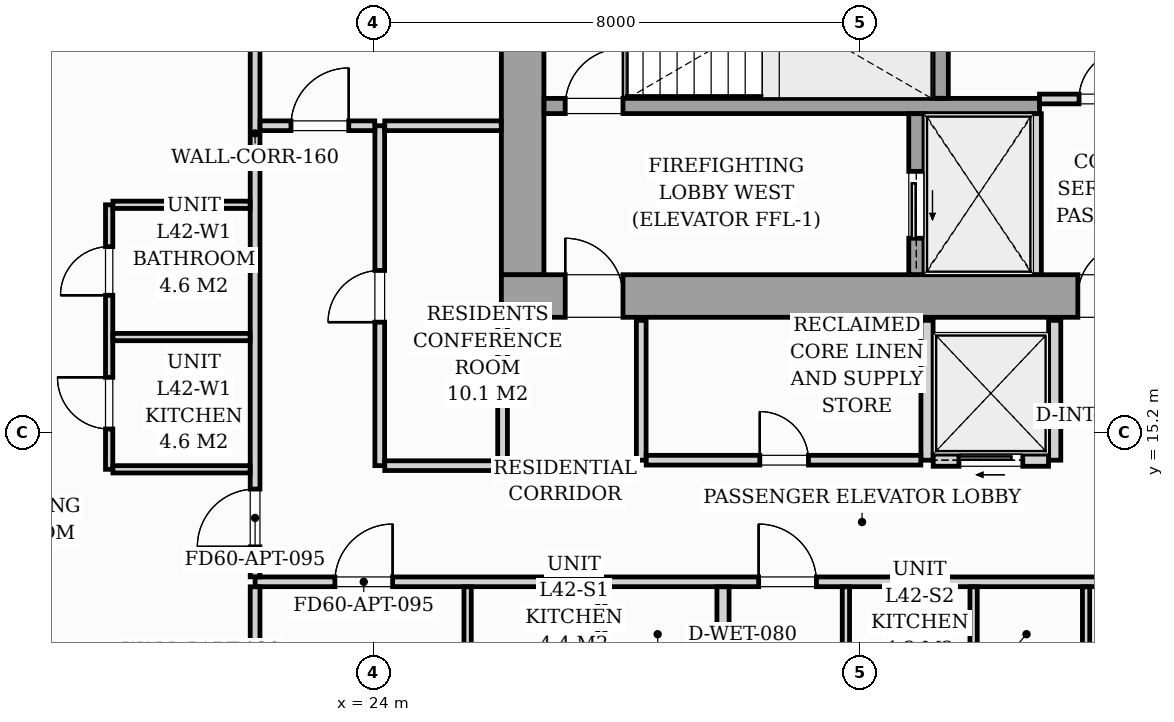
"""IFC4 building model, lengths in metres.
Left out: names, types, materials, properties, quantities, classifications, styles, units other than length and angle.
Written with IfcOpenShell. Run it as: python <this file> out.ifc"""

import sys

from ifc_helpers import new_model, si_unit, direction, frame, frame_2d, origin, origin_2d, place, context, subcontext, project, spatial, rectangle, i_section, extrude, source, transform, mapped, element, fill, save


model = new_model("IFC4")
c1 = context("Model", 3, precision=1e-05, world=origin(), true_north=direction((0.0, 1.0)))
c2 = subcontext(c1, "Body", "Model", "MODEL_VIEW")
j1 = project(units=[si_unit("LENGTHUNIT", "METRE"), si_unit("PLANEANGLEUNIT", "RADIAN")], contexts=[c1])
p1 = place(None, origin())
s1 = spatial("IfcSite", under=j1, at=p1, CompositionType="ELEMENT")
p2 = place(p1, origin())
s2 = spatial("IfcBuilding", under=s1, at=p2, CompositionType="ELEMENT")
p3 = place(p2, frame((0.0, 0.0, 147.0)))
s3 = spatial("IfcBuildingStorey", under=s2, at=p3, CompositionType="ELEMENT", Elevation=147.0)
m1 = source(origin(), c2, "Body", "SweptSolid", [
    extrude(i_section(OverallWidth=0.421, OverallDepth=0.465, WebThickness=0.045, FlangeThickness=0.073, FilletRadius=0.018, at=origin_2d()), origin(), (0.0, 0.0, 1.0), 3.196),
])
for number, where, z_axis, x_axis in (
    (1, (26.4, 17.4, 0.002), (0.0, 0.0, 1.0), (1.0, 0.0, 0.0)),
    (2, (33.12, 17.4, 0.002), (0.0, 0.0, 1.0), (1.0, 0.0, 0.0)),
):
    element("IfcColumn", number, at=place(p3, frame(where, z_axis=z_axis, x_axis=x_axis)), inside=s3, PredefinedType="PILASTER", context=c2, shape_type="MappedRepresentation", body=[
        mapped(m1, transform((0.0, 0.0, 0.0), scale=1.0)),
    ])
p4 = place(p3, frame((26.1, 17.45, 0.0), z_axis=(0.0, 0.0, 1.0), x_axis=(1.0, 0.0, 0.0)))
e3 = element("IfcWall", 3, at=p4, inside=s3, PredefinedType="SHEAR", context=c2, shape_type="SweptSolid", body=[
    extrude(rectangle(XDim=19.8, YDim=0.7, at=frame_2d((9.9, 0.0))), origin(), (0.0, 0.0, 1.0), 3.2),
])
p5 = place(p4, frame((1.05, 0.0, 0.0)))
e4 = element("IfcOpeningElement", 4, at=p5, cuts=e3, PredefinedType="OPENING", context=c2, shape_type="SweptSolid", body=[
    extrude(rectangle(XDim=0.95, YDim=2.06, at=frame_2d((0.475, 1.03))), frame((0.0, 0.36, 0.0), z_axis=(0.0, -1.0, 0.0), x_axis=(1.0, 0.0, 0.0)), (0.0, 0.0, 1.0), 0.72),
])
p6 = place(p4, frame((9.48, 0.0, 0.0)))
e5 = element("IfcOpeningElement", 5, at=p6, cuts=e3, PredefinedType="OPENING", context=c2, shape_type="SweptSolid", body=[
    extrude(rectangle(XDim=0.85, YDim=2.0, at=frame_2d((0.425, 1.0))), frame((0.0, 0.36, 0.0), z_axis=(0.0, -1.0, 0.0), x_axis=(1.0, 0.0, 0.0)), (0.0, 0.0, 1.0), 0.72),
])
p7 = place(p4, frame((17.65, 0.0, 0.0)))
e6 = element("IfcOpeningElement", 6, at=p7, cuts=e3, PredefinedType="OPENING", context=c2, shape_type="SweptSolid", body=[
    extrude(rectangle(XDim=0.95, YDim=2.06, at=frame_2d((0.475, 1.03))), frame((0.0, 0.36, 0.0), z_axis=(0.0, -1.0, 0.0), x_axis=(1.0, 0.0, 0.0)), (0.0, 0.0, 1.0), 0.72),
])
p8 = place(p3, frame((26.45, 17.802, 0.0), z_axis=(0.0, 0.0, 1.0), x_axis=(0.0, 1.0, 0.0)))
e7 = element("IfcWall", 7, at=p8, inside=s3, PredefinedType="SHEAR", context=c2, shape_type="SweptSolid", body=[
    extrude(rectangle(XDim=5.796, YDim=0.7, at=frame_2d((2.898, 0.0))), origin(), (0.0, 0.0, 1.0), 3.2),
])
p9 = place(p3, frame((26.802, 20.575, 0.0), z_axis=(0.0, 0.0, 1.0), x_axis=(1.0, 0.0, 0.0)))
e8 = element("IfcWall", 8, at=p9, inside=s3, PredefinedType="SOLIDWALL", context=c2, shape_type="SweptSolid", body=[
    extrude(rectangle(XDim=8.148, YDim=0.25, at=frame_2d((4.074, 0.0))), origin(), (0.0, 0.0, 1.0), 3.2),
])
p10 = place(p9, frame((0.348, 0.0, 0.0)))
e9 = element("IfcOpeningElement", 9, at=p10, cuts=e8, PredefinedType="OPENING", context=c2, shape_type="SweptSolid", body=[
    extrude(rectangle(XDim=0.95, YDim=2.06, at=frame_2d((0.475, 1.03))), frame((0.0, 0.135, 0.0), z_axis=(0.0, -1.0, 0.0), x_axis=(1.0, 0.0, 0.0)), (0.0, 0.0, 1.0), 0.27),
])
p11 = place(p3, frame((33.325, 20.702, 0.0), z_axis=(0.0, 0.0, 1.0), x_axis=(0.0, 1.0, 0.0)))
e10 = element("IfcWall", 10, at=p11, inside=s3, PredefinedType="SOLIDWALL", context=c2, shape_type="SweptSolid", body=[
    extrude(rectangle(XDim=2.896, YDim=0.25, at=frame_2d((1.448, 0.0))), origin(), (0.0, 0.0, 1.0), 3.2),
])
p12 = place(p3, frame((32.925, 17.802, 0.0), z_axis=(0.0, 0.0, 1.0), x_axis=(0.0, 1.0, 0.0)))
e11 = element("IfcWall", 11, at=p12, inside=s3, PredefinedType="SOLIDWALL", context=c2, shape_type="SweptSolid", body=[
    extrude(rectangle(XDim=2.646, YDim=0.25, at=frame_2d((1.323, 0.0))), origin(), (0.0, 0.0, 1.0), 3.2),
])
p13 = place(p12, frame((0.598, 0.0, 0.0)))
e12 = element("IfcOpeningElement", 12, at=p13, cuts=e11, PredefinedType="OPENING", context=c2, shape_type="SweptSolid", body=[
    extrude(rectangle(XDim=1.1, YDim=2.08, at=frame_2d((0.55, 1.04))), frame((0.0, 0.135, 0.0), z_axis=(0.0, -1.0, 0.0), x_axis=(1.0, 0.0, 0.0)), (0.0, 0.0, 1.0), 0.27),
])
p14 = place(p3, frame((34.9, 17.802, 0.0), z_axis=(0.0, 0.0, 1.0), x_axis=(0.0, 1.0, 0.0)))
e13 = element("IfcWall", 13, at=p14, inside=s3, PredefinedType="PARTITIONING", context=c2, shape_type="SweptSolid", body=[
    extrude(rectangle(XDim=2.646, YDim=0.16, at=frame_2d((1.323, 0.0))), origin(), (0.0, 0.0, 1.0), 2.94),
])
p15 = place(p3, frame((34.95, 20.69, 0.0), z_axis=(0.0, 0.0, 1.0), x_axis=(1.0, 0.0, 0.0)))
e14 = element("IfcWall", 14, at=p15, inside=s3, PredefinedType="PARTITIONING", context=c2, shape_type="SweptSolid", body=[
    extrude(rectangle(XDim=2.1, YDim=0.16, at=frame_2d((1.05, 0.0))), origin(), (0.0, 0.0, 1.0), 2.94),
])
p16 = place(p15, frame((0.65, 0.0, 0.0)))
e15 = element("IfcOpeningElement", 15, at=p16, cuts=e14, PredefinedType="OPENING", context=c2, shape_type="SweptSolid", body=[
    extrude(rectangle(XDim=0.8, YDim=2.05, at=frame_2d((0.4, 1.025))), frame((0.0, 0.09, 0.0), z_axis=(0.0, -1.0, 0.0), x_axis=(1.0, 0.0, 0.0)), (0.0, 0.0, 1.0), 0.18),
])
p17 = place(p3, frame((28.4, 14.75, 0.0), z_axis=(0.0, 0.0, 1.0), x_axis=(0.0, 1.0, 0.0)))
e16 = element("IfcWall", 16, at=p17, inside=s3, PredefinedType="PARTITIONING", context=c2, shape_type="SweptSolid", body=[
    extrude(rectangle(XDim=2.3, YDim=0.16, at=frame_2d((1.15, 0.0))), origin(), (0.0, 0.0, 1.0), 2.94),
])
p18 = place(p3, frame((33.1, 14.75, 0.0), z_axis=(0.0, 0.0, 1.0), x_axis=(0.0, 1.0, 0.0)))
e17 = element("IfcWall", 17, at=p18, inside=s3, PredefinedType="PARTITIONING", context=c2, shape_type="SweptSolid", body=[
    extrude(rectangle(XDim=2.3, YDim=0.2, at=frame_2d((1.15, 0.0))), origin(), (0.0, 0.0, 1.0), 2.94),
])
p19 = place(p3, frame((28.482, 14.75, 0.0), z_axis=(0.0, 0.0, 1.0), x_axis=(1.0, 0.0, 0.0)))
e18 = element("IfcWall", 18, at=p19, inside=s3, PredefinedType="PARTITIONING", context=c2, shape_type="SweptSolid", body=[
    extrude(rectangle(XDim=4.516, YDim=0.16, at=frame_2d((2.258, 0.0))), origin(), (0.0, 0.0, 1.0), 2.94),
])
p20 = place(p19, frame((1.868, 0.0, 0.0)))
e19 = element("IfcOpeningElement", 19, at=p20, cuts=e18, PredefinedType="OPENING", context=c2, shape_type="SweptSolid", body=[
    extrude(rectangle(XDim=0.8, YDim=2.05, at=frame_2d((0.4, 1.025))), frame((0.0, 0.09, 0.0), z_axis=(0.0, -1.0, 0.0), x_axis=(1.0, 0.0, 0.0)), (0.0, 0.0, 1.0), 0.18),
])
p21 = place(p3, frame((35.2, 14.75, 0.0), z_axis=(0.0, 0.0, 1.0), x_axis=(0.0, 1.0, 0.0)))
e20 = element("IfcWall", 20, at=p21, inside=s3, PredefinedType="PARTITIONING", context=c2, shape_type="SweptSolid", body=[
    extrude(rectangle(XDim=2.3, YDim=0.2, at=frame_2d((1.15, 0.0))), origin(), (0.0, 0.0, 1.0), 2.94),
])
p22 = place(p3, frame((33.202, 14.75, 0.0), z_axis=(0.0, 0.0, 1.0), x_axis=(1.0, 0.0, 0.0)))
e21 = element("IfcWall", 21, at=p22, inside=s3, PredefinedType="PARTITIONING", context=c2, shape_type="SweptSolid", body=[
    extrude(rectangle(XDim=1.896, YDim=0.2, at=frame_2d((0.948, 0.0))), origin(), (0.0, 0.0, 1.0), 2.94),
])
p23 = place(p22, frame((0.423, 0.0, 0.0)))
e22 = element("IfcOpeningElement", 22, at=p23, cuts=e21, PredefinedType="OPENING", context=c2, shape_type="SweptSolid", body=[
    extrude(rectangle(XDim=1.05, YDim=2.08, at=frame_2d((0.525, 1.04))), frame((0.0, 0.11, 0.0), z_axis=(0.0, -1.0, 0.0), x_axis=(1.0, 0.0, 0.0)), (0.0, 0.0, 1.0), 0.22),
])
p24 = place(p3, frame((22.05, 12.75, 0.0), z_axis=(0.0, 0.0, 1.0), x_axis=(1.0, 0.0, 0.0)))
e23 = element("IfcWall", 23, at=p24, inside=s3, PredefinedType="PARTITIONING", context=c2, shape_type="SweptSolid", body=[
    extrude(rectangle(XDim=25.65, YDim=0.16, at=frame_2d((12.825, 0.0))), origin(), (0.0, 0.0, 1.0), 2.94),
])
p25 = place(p24, frame((1.312, 0.0, 0.0)))
e24 = element("IfcOpeningElement", 24, at=p25, cuts=e23, PredefinedType="OPENING", context=c2, shape_type="SweptSolid", body=[
    extrude(rectangle(XDim=0.95, YDim=2.06, at=frame_2d((0.475, 1.03))), frame((0.0, 0.09, 0.0), z_axis=(0.0, -1.0, 0.0), x_axis=(1.0, 0.0, 0.0)), (0.0, 0.0, 1.0), 0.18),
])
p26 = place(p24, frame((8.281, 0.0, 0.0)))
e25 = element("IfcOpeningElement", 25, at=p26, cuts=e23, PredefinedType="OPENING", context=c2, shape_type="SweptSolid", body=[
    extrude(rectangle(XDim=0.95, YDim=2.06, at=frame_2d((0.475, 1.03))), frame((0.0, 0.09, 0.0), z_axis=(0.0, -1.0, 0.0), x_axis=(1.0, 0.0, 0.0)), (0.0, 0.0, 1.0), 0.18),
])
p27 = place(p24, frame((17.268, 0.0, 0.0)))
e26 = element("IfcOpeningElement", 26, at=p27, cuts=e23, PredefinedType="OPENING", context=c2, shape_type="SweptSolid", body=[
    extrude(rectangle(XDim=0.95, YDim=2.06, at=frame_2d((0.475, 1.03))), frame((0.0, 0.09, 0.0), z_axis=(0.0, -1.0, 0.0), x_axis=(1.0, 0.0, 0.0)), (0.0, 0.0, 1.0), 0.18),
])
p28 = place(p3, frame((22.05, 8.253, 0.0), z_axis=(0.0, 0.0, 1.0), x_axis=(0.0, 1.0, 0.0)))
e27 = element("IfcWall", 27, at=p28, inside=s3, PredefinedType="PARTITIONING", context=c2, shape_type="SweptSolid", body=[
    extrude(rectangle(XDim=4.415, YDim=0.16, at=frame_2d((2.208, 0.0))), origin(), (0.0, 0.0, 1.0), 2.94),
])
p29 = place(p3, frame((22.05, 12.832, 0.0), z_axis=(0.0, 0.0, 1.0), x_axis=(0.0, 1.0, 0.0)))
e28 = element("IfcWall", 28, at=p29, inside=s3, PredefinedType="PARTITIONING", context=c2, shape_type="SweptSolid", body=[
    extrude(rectangle(XDim=14.585, YDim=0.16, at=frame_2d((7.292, 0.0))), origin(), (0.0, 0.0, 1.0), 2.94),
])
p30 = place(p29, frame((0.493, 0.0, 0.0)))
e29 = element("IfcOpeningElement", 29, at=p30, cuts=e28, PredefinedType="OPENING", context=c2, shape_type="SweptSolid", body=[
    extrude(rectangle(XDim=0.95, YDim=2.06, at=frame_2d((0.475, 1.03))), frame((0.0, 0.09, 0.0), z_axis=(0.0, -1.0, 0.0), x_axis=(1.0, 0.0, 0.0)), (0.0, 0.0, 1.0), 0.18),
])
for number, where, z_axis, x_axis in (
    (30, (25.545, 10.562, 0.0), (0.0, 0.0, 1.0), (0.0, 1.0, 0.0)),
    (31, (27.745, 10.562, 0.0), (0.0, 0.0, 1.0), (0.0, 1.0, 0.0)),
):
    element("IfcWall", number, at=place(p3, frame(where, z_axis=z_axis, x_axis=x_axis)), inside=s3, PredefinedType="PARTITIONING", context=c2, shape_type="SweptSolid", body=[
        extrude(rectangle(XDim=2.106, YDim=0.12, at=frame_2d((1.053, 0.0))), origin(), (0.0, 0.0, 1.0), 2.94),
    ])
p31 = place(p3, frame((29.745, 10.562, 0.0), z_axis=(0.0, 0.0, 1.0), x_axis=(0.0, 1.0, 0.0)))
e32 = element("IfcWall", 32, at=p31, inside=s3, PredefinedType="PARTITIONING", context=c2, shape_type="SweptSolid", body=[
    extrude(rectangle(XDim=2.106, YDim=0.2, at=frame_2d((1.053, 0.0))), origin(), (0.0, 0.0, 1.0), 2.94),
])
p32 = place(p3, frame((35.716, 6.754, 0.0), z_axis=(0.0, 0.0, 1.0), x_axis=(0.0, 1.0, 0.0)))
e33 = element("IfcWall", 33, at=p32, inside=s3, PredefinedType="PARTITIONING", context=c2, shape_type="SweptSolid", body=[
    extrude(rectangle(XDim=5.914, YDim=0.12, at=frame_2d((2.957, 0.0))), origin(), (0.0, 0.0, 1.0), 2.94),
])
p33 = place(p32, frame((2.646, 0.0, 0.0)))
e34 = element("IfcOpeningElement", 34, at=p33, cuts=e33, PredefinedType="OPENING", context=c2, shape_type="SweptSolid", body=[
    extrude(rectangle(XDim=0.9, YDim=2.05, at=frame_2d((0.45, 1.025))), frame((0.0, 0.07, 0.0), z_axis=(0.0, -1.0, 0.0), x_axis=(1.0, 0.0, 0.0)), (0.0, 0.0, 1.0), 0.14),
])
for number, where, z_axis, x_axis in (
    (35, (33.866, 10.562, 0.0), (0.0, 0.0, 1.0), (0.0, 1.0, 0.0)),
    (36, (31.766, 10.562, 0.0), (0.0, 0.0, 1.0), (0.0, 1.0, 0.0)),
):
    element("IfcWall", number, at=place(p3, frame(where, z_axis=z_axis, x_axis=x_axis)), inside=s3, PredefinedType="PARTITIONING", context=c2, shape_type="SweptSolid", body=[
        extrude(rectangle(XDim=2.106, YDim=0.12, at=frame_2d((1.053, 0.0))), origin(), (0.0, 0.0, 1.0), 2.94),
    ])
p34 = place(p3, frame((19.65, 14.6, 0.0), z_axis=(0.0, 0.0, 1.0), x_axis=(0.0, 1.0, 0.0)))
e37 = element("IfcWall", 37, at=p34, inside=s3, PredefinedType="PARTITIONING", context=c2, shape_type="SweptSolid", body=[
    extrude(rectangle(XDim=4.35, YDim=0.12, at=frame_2d((2.175, 0.0))), origin(), (0.0, 0.0, 1.0), 2.94),
])
p35 = place(p34, frame((0.663, 0.0, 0.0)))
e38 = element("IfcOpeningElement", 38, at=p35, cuts=e37, PredefinedType="OPENING", context=c2, shape_type="SweptSolid", body=[
    extrude(rectangle(XDim=0.85, YDim=2.05, at=frame_2d((0.425, 1.025))), frame((0.0, 0.07, 0.0), z_axis=(0.0, -1.0, 0.0), x_axis=(1.0, 0.0, 0.0)), (0.0, 0.0, 1.0), 0.14),
])
p36 = place(p34, frame((2.862, 0.0, 0.0)))
e39 = element("IfcOpeningElement", 39, at=p36, cuts=e37, PredefinedType="OPENING", context=c2, shape_type="SweptSolid", body=[
    extrude(rectangle(XDim=0.8, YDim=2.02, at=frame_2d((0.4, 1.01))), frame((0.0, 0.07, 0.0), z_axis=(0.0, -1.0, 0.0), x_axis=(1.0, 0.0, 0.0)), (0.0, 0.0, 1.0), 0.14),
])
for number, where, z_axis, x_axis in (
    (40, (19.712, 16.775, 0.0), (0.0, 0.0, 1.0), (1.0, 0.0, 0.0)),
    (41, (19.712, 14.6, 0.0), (0.0, 0.0, 1.0), (1.0, 0.0, 0.0)),
    (42, (19.712, 18.95, 0.0), (0.0, 0.0, 1.0), (1.0, 0.0, 0.0)),
):
    element("IfcWall", number, at=place(p3, frame(where, z_axis=z_axis, x_axis=x_axis)), inside=s3, PredefinedType="PARTITIONING", context=c2, shape_type="SweptSolid", body=[
        extrude(rectangle(XDim=2.256, YDim=0.12, at=frame_2d((1.128, 0.0))), origin(), (0.0, 0.0, 1.0), 2.94),
    ])
p37 = place(p3, frame((24.1, 14.66, 0.0), z_axis=(0.0, 0.0, 1.0), x_axis=(0.0, 1.0, 0.0)))
e43 = element("IfcWall", 43, at=p37, inside=s3, PredefinedType="PARTITIONING", context=c2, shape_type="SweptSolid", body=[
    extrude(rectangle(XDim=5.59, YDim=0.16, at=frame_2d((2.795, 0.0))), origin(), (0.0, 0.0, 1.0), 2.94),
])
p38 = place(p37, frame((2.36, 0.0, 0.0)))
e44 = element("IfcOpeningElement", 44, at=p38, cuts=e43, PredefinedType="OPENING", context=c2, shape_type="SweptSolid", body=[
    extrude(rectangle(XDim=0.85, YDim=2.0, at=frame_2d((0.425, 1.0))), frame((0.0, 0.09, 0.0), z_axis=(0.0, -1.0, 0.0), x_axis=(1.0, 0.0, 0.0)), (0.0, 0.0, 1.0), 0.18),
])
p39 = place(p3, frame((22.132, 20.25, 0.0), z_axis=(0.0, 0.0, 1.0), x_axis=(1.0, 0.0, 0.0)))
e45 = element("IfcWall", 45, at=p39, inside=s3, PredefinedType="PARTITIONING", context=c2, shape_type="SweptSolid", body=[
    extrude(rectangle(XDim=1.886, YDim=0.16, at=frame_2d((0.943, 0.0))), origin(), (0.0, 0.0, 1.0), 2.94),
])
p40 = place(p39, frame((0.508, 0.0, 0.0)))
e46 = element("IfcOpeningElement", 46, at=p40, cuts=e45, PredefinedType="OPENING", context=c2, shape_type="SweptSolid", body=[
    extrude(rectangle(XDim=0.95, YDim=2.06, at=frame_2d((0.475, 1.03))), frame((0.0, 0.09, 0.0), z_axis=(0.0, -1.0, 0.0), x_axis=(1.0, 0.0, 0.0)), (0.0, 0.0, 1.0), 0.18),
])
p41 = place(p3, frame((24.182, 20.25, 0.0), z_axis=(0.0, 0.0, 1.0), x_axis=(1.0, 0.0, 0.0)))
e47 = element("IfcWall", 47, at=p41, inside=s3, PredefinedType="PARTITIONING", context=c2, shape_type="SweptSolid", body=[
    extrude(rectangle(XDim=1.916, YDim=0.16, at=frame_2d((0.958, 0.0))), origin(), (0.0, 0.0, 1.0), 2.94),
])
p42 = place(p3, frame((26.12, 14.66, 0.0), z_axis=(0.0, 0.0, 1.0), x_axis=(0.0, 1.0, 0.0)))
e48 = element("IfcWall", 48, at=p42, inside=s3, PredefinedType="PARTITIONING", context=c2, shape_type="SweptSolid", body=[
    extrude(rectangle(XDim=2.438, YDim=0.16, at=frame_2d((1.219, 0.0))), origin(), (0.0, 0.0, 1.0), 2.94),
])
p43 = place(p3, frame((24.182, 14.66, 0.0), z_axis=(0.0, 0.0, 1.0), x_axis=(1.0, 0.0, 0.0)))
e49 = element("IfcWall", 49, at=p43, inside=s3, PredefinedType="PARTITIONING", context=c2, shape_type="SweptSolid", body=[
    extrude(rectangle(XDim=1.856, YDim=0.16, at=frame_2d((0.928, 0.0))), origin(), (0.0, 0.0, 1.0), 2.94),
])
m2 = source(origin(), c2, "Body", "SweptSolid", [
    extrude(rectangle(XDim=0.95, YDim=2.06, at=frame_2d((0.475, 1.03))), frame((0.0, 0.025, 0.0), z_axis=(0.0, -1.0, 0.0), x_axis=(1.0, 0.0, 0.0)), (0.0, 0.0, 1.0), 0.05),
])
p44 = place(p5, origin())
e50 = element("IfcDoor", 50, at=p44, inside=s3, OperationType="SINGLE_SWING_LEFT", PredefinedType="DOOR", context=c2, shape_type="MappedRepresentation", body=[
    mapped(m2, transform((0.0, 0.0, 0.0), scale=1.0)),
])
fill(e4, e50)
m3 = source(origin(), c2, "Body", "SweptSolid", [
    extrude(rectangle(XDim=0.85, YDim=2.0, at=frame_2d((0.425, 1.0))), frame((0.0, 0.025, 0.0), z_axis=(0.0, -1.0, 0.0), x_axis=(1.0, 0.0, 0.0)), (0.0, 0.0, 1.0), 0.05),
])
p45 = place(p6, origin())
e51 = element("IfcDoor", 51, at=p45, inside=s3, OperationType="SINGLE_SWING_RIGHT", PredefinedType="DOOR", context=c2, shape_type="MappedRepresentation", body=[
    mapped(m3, transform((0.0, 0.0, 0.0), scale=1.0)),
])
fill(e5, e51)
p46 = place(p10, origin())
e52 = element("IfcDoor", 52, at=p46, inside=s3, OperationType="SINGLE_SWING_RIGHT", PredefinedType="DOOR", context=c2, shape_type="MappedRepresentation", body=[
    mapped(m2, transform((0.0, 0.0, 0.0), scale=1.0)),
])
fill(e9, e52)
m4 = source(origin(), c2, "Body", "SweptSolid", [
    extrude(rectangle(XDim=1.1, YDim=2.08, at=frame_2d((0.55, 1.04))), frame((0.0, 0.025, 0.0), z_axis=(0.0, -1.0, 0.0), x_axis=(1.0, 0.0, 0.0)), (0.0, 0.0, 1.0), 0.05),
])
p47 = place(p13, origin())
e53 = element("IfcDoor", 53, at=p47, inside=s3, OperationType="SLIDING_TO_LEFT", PredefinedType="DOOR", context=c2, shape_type="MappedRepresentation", body=[
    mapped(m4, transform((0.0, 0.0, 0.0), scale=1.0)),
])
fill(e12, e53)
m5 = source(origin(), c2, "Body", "SweptSolid", [
    extrude(rectangle(XDim=0.8, YDim=2.05, at=frame_2d((0.4, 1.025))), frame((0.0, 0.025, 0.0), z_axis=(0.0, -1.0, 0.0), x_axis=(1.0, 0.0, 0.0)), (0.0, 0.0, 1.0), 0.05),
])
p48 = place(p16, origin())
e54 = element("IfcDoor", 54, at=p48, inside=s3, OperationType="SINGLE_SWING_RIGHT", PredefinedType="DOOR", context=c2, shape_type="MappedRepresentation", body=[
    mapped(m5, transform((0.0, 0.0, 0.0), scale=1.0)),
])
fill(e15, e54)
p49 = place(p20, origin())
e55 = element("IfcDoor", 55, at=p49, inside=s3, OperationType="SINGLE_SWING_LEFT", PredefinedType="DOOR", context=c2, shape_type="MappedRepresentation", body=[
    mapped(m5, transform((0.0, 0.0, 0.0), scale=1.0)),
])
fill(e19, e55)
m6 = source(origin(), c2, "Body", "SweptSolid", [
    extrude(rectangle(XDim=1.05, YDim=2.08, at=frame_2d((0.525, 1.04))), frame((0.0, 0.025, 0.0), z_axis=(0.0, -1.0, 0.0), x_axis=(1.0, 0.0, 0.0)), (0.0, 0.0, 1.0), 0.05),
])
p50 = place(p23, origin())
e56 = element("IfcDoor", 56, at=p50, inside=s3, OperationType="SLIDING_TO_LEFT", PredefinedType="DOOR", context=c2, shape_type="MappedRepresentation", body=[
    mapped(m6, transform((0.0, 0.0, 0.0), scale=1.0)),
])
fill(e22, e56)
m7 = source(origin(), c2, "Body", "SweptSolid", [
    extrude(rectangle(XDim=0.95, YDim=2.06, at=frame_2d((0.475, 1.03))), frame((0.0, 0.025, 0.0), z_axis=(0.0, -1.0, 0.0), x_axis=(1.0, 0.0, 0.0)), (0.0, 0.0, 1.0), 0.05),
])
p51 = place(p25, origin())
e57 = element("IfcDoor", 57, at=p51, inside=s3, OperationType="SINGLE_SWING_RIGHT", PredefinedType="DOOR", context=c2, shape_type="MappedRepresentation", body=[
    mapped(m7, transform((0.0, 0.0, 0.0), scale=1.0)),
])
fill(e24, e57)
p52 = place(p26, origin())
e58 = element("IfcDoor", 58, at=p52, inside=s3, OperationType="SINGLE_SWING_LEFT", PredefinedType="DOOR", context=c2, shape_type="MappedRepresentation", body=[
    mapped(m7, transform((0.0, 0.0, 0.0), scale=1.0)),
])
fill(e25, e58)
p53 = place(p30, origin())
e59 = element("IfcDoor", 59, at=p53, inside=s3, OperationType="SINGLE_SWING_LEFT", PredefinedType="DOOR", context=c2, shape_type="MappedRepresentation", body=[
    mapped(m7, transform((0.0, 0.0, 0.0), scale=1.0)),
])
fill(e29, e59)
m8 = source(origin(), c2, "Body", "SweptSolid", [
    extrude(rectangle(XDim=0.85, YDim=2.05, at=frame_2d((0.425, 1.025))), frame((0.0, 0.025, 0.0), z_axis=(0.0, -1.0, 0.0), x_axis=(1.0, 0.0, 0.0)), (0.0, 0.0, 1.0), 0.05),
])
p54 = place(p35, origin())
e60 = element("IfcDoor", 60, at=p54, inside=s3, OperationType="SINGLE_SWING_RIGHT", PredefinedType="DOOR", context=c2, shape_type="MappedRepresentation", body=[
    mapped(m8, transform((0.0, 0.0, 0.0), scale=1.0)),
])
fill(e38, e60)
m9 = source(origin(), c2, "Body", "SweptSolid", [
    extrude(rectangle(XDim=0.8, YDim=2.02, at=frame_2d((0.4, 1.01))), frame((0.0, 0.025, 0.0), z_axis=(0.0, -1.0, 0.0), x_axis=(1.0, 0.0, 0.0)), (0.0, 0.0, 1.0), 0.05),
])
p55 = place(p36, origin())
e61 = element("IfcDoor", 61, at=p55, inside=s3, OperationType="SINGLE_SWING_LEFT", PredefinedType="DOOR", context=c2, shape_type="MappedRepresentation", body=[
    mapped(m9, transform((0.0, 0.0, 0.0), scale=1.0)),
])
fill(e39, e61)
p56 = place(p38, origin())
e62 = element("IfcDoor", 62, at=p56, inside=s3, OperationType="SINGLE_SWING_LEFT", PredefinedType="DOOR", context=c2, shape_type="MappedRepresentation", body=[
    mapped(m3, transform((0.0, 0.0, 0.0), scale=1.0)),
])
fill(e44, e62)
p57 = place(p40, origin())
e63 = element("IfcDoor", 63, at=p57, inside=s3, OperationType="SINGLE_SWING_RIGHT", PredefinedType="DOOR", context=c2, shape_type="MappedRepresentation", body=[
    mapped(m7, transform((0.0, 0.0, 0.0), scale=1.0)),
])
fill(e46, e63)
save(model, sys.argv[1])
